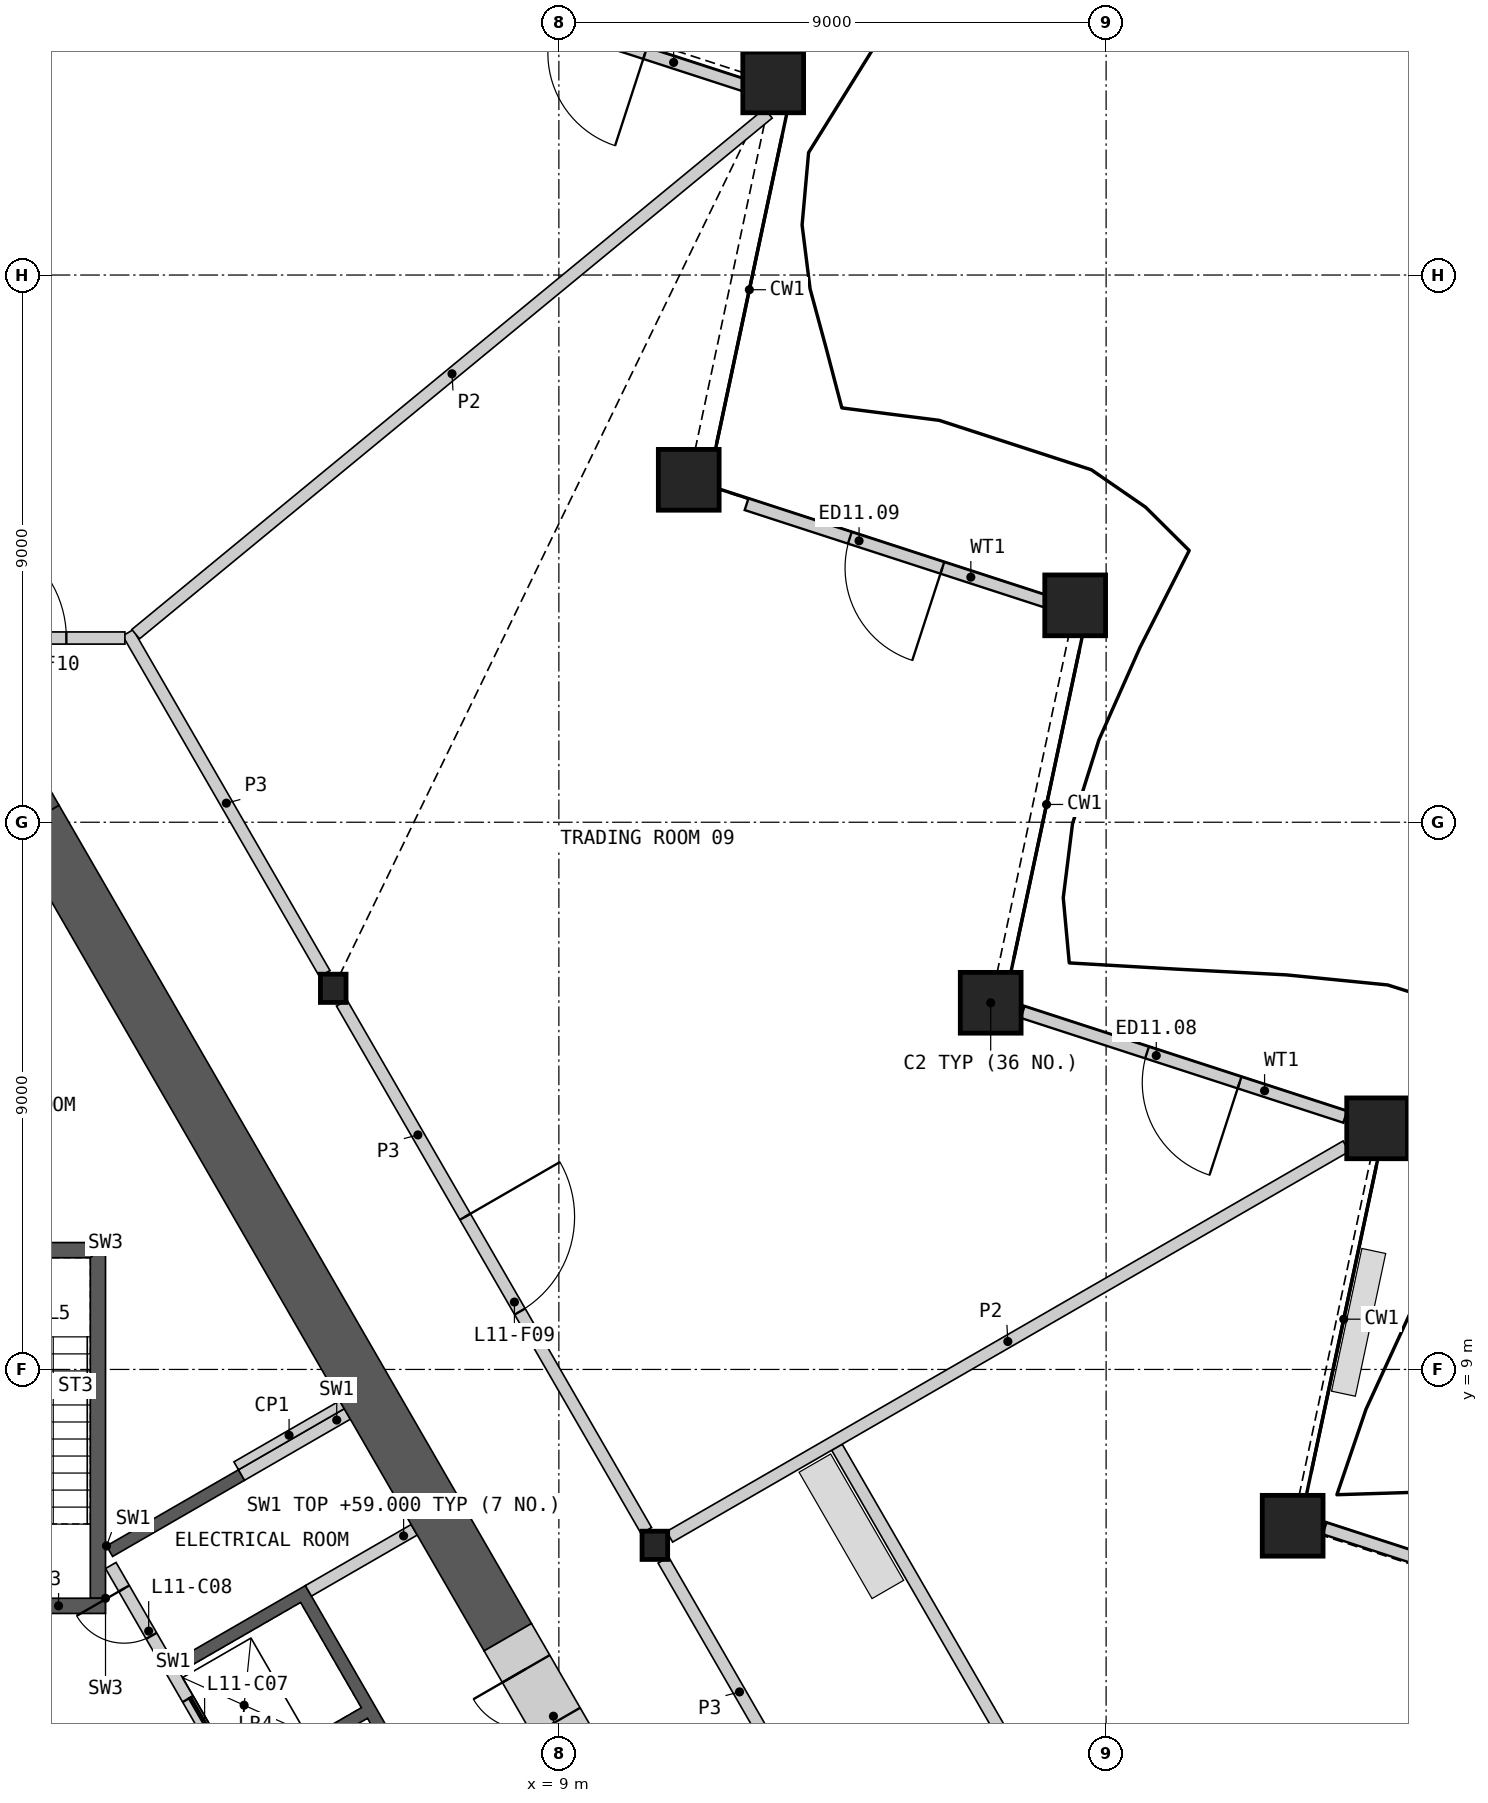
"""IFC4 building model, lengths in metres.
Left out: names, types, materials, properties, quantities, classifications, styles, units other than length and angle.
Written with IfcOpenShell. Run it as: python <this file> out.ifc"""

import sys

from ifc_helpers import new_model, si_unit, direction, frame, frame_2d, origin, origin_2d, place, context, subcontext, project, spatial, polyline, rectangle, hollow_rectangle, i_section, outline, extrude, element, fill, save


model = new_model("IFC4")
c1 = context("Model", 3, precision=1e-05, world=origin(), true_north=direction((0.0, 1.0)))
c2 = subcontext(c1, "Body", "Model", "MODEL_VIEW")
j1 = project(units=[si_unit("LENGTHUNIT", "METRE"), si_unit("PLANEANGLEUNIT", "RADIAN")], contexts=[c1])
p1 = place(None, origin())
s1 = spatial("IfcSite", under=j1, at=p1, CompositionType="ELEMENT")
p2 = place(p1, origin())
s2 = spatial("IfcBuilding", under=s1, at=p2, CompositionType="ELEMENT")
p3 = place(p2, frame((0.0, 0.0, 55.2)))
s3 = spatial("IfcBuildingStorey", under=s2, at=p3, CompositionType="ELEMENT", Elevation=55.2)
for number, where, z_axis, x_axis in (
    (1, (21.068, 6.429, 0.0), (0.0, 0.0, 1.0), (1.0, 0.0, 0.0)),
    (2, (22.457, 12.966, 0.0), (0.0, 0.0, 1.0), (1.0, 0.0, 0.0)),
    (3, (16.102, 15.031, 0.0), (0.0, 0.0, 1.0), (1.0, 0.0, 0.0)),
    (4, (17.491, 21.567, 0.0), (0.0, 0.0, 1.0), (1.0, 0.0, 0.0)),
    (5, (11.136, 23.632, 0.0), (0.0, 0.0, 1.0), (1.0, 0.0, 0.0)),
    (6, (12.525, 30.169, 0.0), (0.0, 0.0, 1.0), (1.0, 0.0, 0.0)),
):
    element("IfcColumn", number, at=place(p3, frame(where, z_axis=z_axis, x_axis=x_axis)), inside=s3, PredefinedType="COLUMN", context=c2, shape_type="SweptSolid", body=[
        extrude(hollow_rectangle(XDim=1.0, YDim=1.0, WallThickness=0.07, at=origin_2d()), origin(), (0.0, 0.0, 1.0), 4.2),
    ])
for number, where, z_axis, x_axis in (
    (7, (10.578, 6.107, 0.0), (0.0, 0.0, 1.0), (1.0, 0.0, 0.0)),
    (8, (5.289, 15.269, 0.0), (0.0, 0.0, 1.0), (1.0, 0.0, 0.0)),
):
    element("IfcColumn", number, at=place(p3, frame(where, z_axis=z_axis, x_axis=x_axis)), inside=s3, PredefinedType="COLUMN", context=c2, shape_type="SweptSolid", body=[
        extrude(i_section(OverallWidth=0.421, OverallDepth=0.465, WebThickness=0.045, FlangeThickness=0.072, at=origin_2d()), origin(), (0.0, 0.0, 1.0), 4.2),
    ])
p4 = place(p3, frame((26.899, 4.661, 0.0), z_axis=(0.0, 0.0, 1.0), x_axis=(-0.951054004345, 0.309024725255, 0.0)))
e9 = element("IfcWall", 9, at=p4, inside=s3, PredefinedType="SOLIDWALL", context=c2, shape_type="SweptSolid", body=[
    extrude(rectangle(XDim=5.579, YDim=0.2, at=frame_2d((2.79, 0.0))), origin(), (0.0, 0.0, 1.0), 3.189),
])
p5 = place(p4, frame((1.91, 0.0, 0.0)))
e10 = element("IfcOpeningElement", 10, at=p5, cuts=e9, PredefinedType="OPENING", context=c2, shape_type="SweptSolid", body=[
    extrude(rectangle(XDim=1.6, YDim=2.4, at=frame_2d((0.8, 1.2))), frame((0.0, 0.11, 0.0), z_axis=(0.0, -1.0, 0.0), x_axis=(1.0, 0.0, 0.0)), (0.0, 0.0, 1.0), 0.22),
])
p6 = place(p3, frame((21.933, 13.153, 0.0), z_axis=(0.0, 0.0, 1.0), x_axis=(-0.951066864375, 0.308985144444, 0.0)))
e11 = element("IfcWall", 11, at=p6, inside=s3, PredefinedType="SOLIDWALL", context=c2, shape_type="SweptSolid", body=[
    extrude(rectangle(XDim=5.579, YDim=0.2, at=frame_2d((2.79, 0.0))), origin(), (0.0, 0.0, 1.0), 3.189),
])
p7 = place(p6, frame((1.828, 0.0, 0.0)))
e12 = element("IfcOpeningElement", 12, at=p7, cuts=e11, PredefinedType="OPENING", context=c2, shape_type="SweptSolid", body=[
    extrude(rectangle(XDim=1.6, YDim=2.4, at=frame_2d((0.8, 1.2))), frame((0.0, 0.11, 0.0), z_axis=(0.0, -1.0, 0.0), x_axis=(1.0, 0.0, 0.0)), (0.0, 0.0, 1.0), 0.22),
])
p8 = place(p3, frame((17.005, 21.631, 0.0), z_axis=(0.0, 0.0, 1.0), x_axis=(-0.951045170621, 0.309051910588, 0.0)))
e13 = element("IfcWall", 13, at=p8, inside=s3, PredefinedType="SOLIDWALL", context=c2, shape_type="SweptSolid", body=[
    extrude(rectangle(XDim=5.171, YDim=0.2, at=frame_2d((2.585, 0.0))), origin(), (0.0, 0.0, 1.0), 3.189),
])
p9 = place(p8, frame((1.786, 0.0, 0.0)))
e14 = element("IfcOpeningElement", 14, at=p9, cuts=e13, PredefinedType="OPENING", context=c2, shape_type="SweptSolid", body=[
    extrude(rectangle(XDim=1.6, YDim=2.4, at=frame_2d((0.8, 1.2))), frame((0.0, 0.11, 0.0), z_axis=(0.0, -1.0, 0.0), x_axis=(1.0, 0.0, 0.0)), (0.0, 0.0, 1.0), 0.22),
])
p10 = place(p3, frame((12.117, 30.097, 0.0), z_axis=(0.0, 0.0, 1.0), x_axis=(-0.951063554534, 0.308995332064, 0.0)))
e15 = element("IfcWall", 15, at=p10, inside=s3, PredefinedType="SOLIDWALL", context=c2, shape_type="SweptSolid", body=[
    extrude(rectangle(XDim=5.171, YDim=0.2, at=frame_2d((2.586, 0.0))), origin(), (0.0, 0.0, 1.0), 3.189),
])
p11 = place(p10, frame((1.786, 0.0, 0.0)))
e16 = element("IfcOpeningElement", 16, at=p11, cuts=e15, PredefinedType="OPENING", context=c2, shape_type="SweptSolid", body=[
    extrude(rectangle(XDim=1.6, YDim=2.4, at=frame_2d((0.8, 1.2))), frame((0.0, 0.11, 0.0), z_axis=(0.0, -1.0, 0.0), x_axis=(1.0, 0.0, 0.0)), (0.0, 0.0, 1.0), 0.22),
])
p12 = place(p3, origin())
e17 = element("IfcWall", 17, at=p12, inside=s3, PredefinedType="SHEAR", context=c2, shape_type="SweptSolid", body=[
    extrude(outline(polyline([(1.561, 6.097), (3.731, 7.35), (3.831, 7.177), (1.66, 5.924), (1.561, 6.097)])), origin(), (0.0, 0.0, 1.0), 3.8),
])
p13 = place(p3, origin())
e18 = element("IfcWall", 18, at=p13, inside=s3, PredefinedType="SHEAR", context=c2, shape_type="SweptSolid", body=[
    extrude(outline(polyline([(2.66, 4.192), (4.831, 5.445), (8.231, -0.444), (6.061, -1.697), (5.96, -1.524), (7.952, -0.374), (6.952, 1.358), (4.96, 0.208), (4.861, 0.381), (6.852, 1.531), (5.852, 3.263), (3.861, 2.113), (3.76, 2.287), (5.752, 3.437), (4.752, 5.169), (2.76, 4.019), (2.66, 4.192)])), origin(), (0.0, 0.0, 1.0), 3.8),
])
p14 = place(p3, frame((5.817, -1.476, 0.0), z_axis=(0.0, 0.0, 1.0), x_axis=(-0.500002616675, 0.866023893041, 0.0)))
e19 = element("IfcWall", 19, at=p14, inside=s3, PredefinedType="SOLIDWALL", context=c2, shape_type="SweptSolid", body=[
    extrude(rectangle(XDim=8.373, YDim=0.2, at=frame_2d((4.187, 0.0))), origin(), (0.0, 0.0, 1.0), 3.8),
])
p15 = place(p14, frame((0.337, 0.0, 0.0)))
e20 = element("IfcOpeningElement", 20, at=p15, cuts=e19, PredefinedType="OPENING", context=c2, shape_type="SweptSolid", body=[
    extrude(rectangle(XDim=1.1, YDim=2.1, at=frame_2d((0.55, 1.05))), frame((0.0, 0.11, 0.0), z_axis=(0.0, -1.0, 0.0), x_axis=(1.0, 0.0, 0.0)), (0.0, 0.0, 1.0), 0.22),
])
p16 = place(p14, frame((2.537, 0.0, 0.0)))
e21 = element("IfcOpeningElement", 21, at=p16, cuts=e19, PredefinedType="OPENING", context=c2, shape_type="SweptSolid", body=[
    extrude(rectangle(XDim=1.1, YDim=2.1, at=frame_2d((0.55, 1.05))), frame((0.0, 0.11, 0.0), z_axis=(0.0, -1.0, 0.0), x_axis=(1.0, 0.0, 0.0)), (0.0, 0.0, 1.0), 0.22),
])
p17 = place(p14, frame((4.737, 0.0, 0.0)))
e22 = element("IfcOpeningElement", 22, at=p17, cuts=e19, PredefinedType="OPENING", context=c2, shape_type="SweptSolid", body=[
    extrude(rectangle(XDim=1.1, YDim=2.1, at=frame_2d((0.55, 1.05))), frame((0.0, 0.11, 0.0), z_axis=(0.0, -1.0, 0.0), x_axis=(1.0, 0.0, 0.0)), (0.0, 0.0, 1.0), 0.22),
])
p18 = place(p14, frame((7.037, 0.0, 0.0)))
e23 = element("IfcOpeningElement", 23, at=p18, cuts=e19, PredefinedType="OPENING", context=c2, shape_type="SweptSolid", body=[
    extrude(rectangle(XDim=0.9, YDim=2.1, at=frame_2d((0.45, 1.05))), frame((0.0, 0.11, 0.0), z_axis=(0.0, -1.0, 0.0), x_axis=(1.0, 0.0, 0.0)), (0.0, 0.0, 1.0), 0.22),
])
p19 = place(p3, frame((4.881, 5.358, 0.0), z_axis=(0.0, 0.0, 1.0), x_axis=(0.866035824272, 0.499981950752, 0.0)))
e24 = element("IfcWall", 24, at=p19, inside=s3, PredefinedType="SHEAR", context=c2, shape_type="SweptSolid", body=[
    extrude(rectangle(XDim=2.009, YDim=0.2, at=frame_2d((1.004, 0.0))), origin(), (0.0, 0.0, 1.0), 3.8),
])
p20 = place(p3, frame((3.781, 7.263, 0.0), z_axis=(0.0, 0.0, 1.0), x_axis=(0.865983199114, 0.50007309351, 0.0)))
e25 = element("IfcWall", 25, at=p20, inside=s3, PredefinedType="SHEAR", context=c2, shape_type="SweptSolid", body=[
    extrude(rectangle(XDim=2.009, YDim=0.2, at=frame_2d((1.004, 0.0))), origin(), (0.0, 0.0, 1.0), 3.8),
])
p21 = place(p3, origin())
e26 = element("IfcWall", 26, at=p21, inside=s3, PredefinedType="SHEAR", context=c2, shape_type="SweptSolid", body=[
    extrude(outline(polyline([(1.544, 5.237), (1.544, 11.087), (1.294, 10.837), (1.294, 5.237), (1.544, 5.237)])), origin(), (0.0, 0.0, 1.0), 3.8),
])
p22 = place(p3, origin())
e27 = element("IfcWall", 27, at=p22, inside=s3, PredefinedType="SHEAR", context=c2, shape_type="SweptSolid", body=[
    extrude(outline(polyline([(1.544, 11.087), (-1.544, 11.087), (-1.294, 10.837), (1.294, 10.837), (1.544, 11.087)])), origin(), (0.0, 0.0, 1.0), 3.8),
])
p23 = place(p3, frame((1.544, 5.112, 0.0), z_axis=(0.0, 0.0, 1.0), x_axis=(-1.0, 0.0, 0.0)))
e28 = element("IfcWall", 28, at=p23, inside=s3, PredefinedType="SHEAR", context=c2, shape_type="SweptSolid", body=[
    extrude(rectangle(XDim=3.088, YDim=0.25, at=frame_2d((1.544, 0.0))), origin(), (0.0, 0.0, 1.0), 3.8),
])
p24 = place(p23, frame((0.994, 0.0, 0.0)))
e29 = element("IfcOpeningElement", 29, at=p24, cuts=e28, PredefinedType="OPENING", context=c2, shape_type="SweptSolid", body=[
    extrude(rectangle(XDim=1.1, YDim=2.1, at=frame_2d((0.55, 1.05))), frame((0.0, 0.135, 0.0), z_axis=(0.0, -1.0, 0.0), x_axis=(1.0, 0.0, 0.0)), (0.0, 0.0, 1.0), 0.27),
])
p25 = place(p3, frame((3.693, 7.415, 0.0), z_axis=(0.0, 0.0, 1.0), x_axis=(0.866035824272, 0.499981950752, 0.0)))
e30 = element("IfcWall", 30, at=p25, inside=s3, PredefinedType="PARTITIONING", context=c2, shape_type="SweptSolid", body=[
    extrude(rectangle(XDim=2.009, YDim=0.15, at=frame_2d((1.004, 0.0))), origin(), (0.0, 0.0, 1.0), 3.8),
])
p26 = place(p3, frame((8.16, 4.596, 0.0), z_axis=(0.0, 0.0, 1.0), x_axis=(-0.500009830349, 0.866019728156, 0.0)))
e31 = element("IfcWall", 31, at=p26, inside=s3, PredefinedType="SHEAR", context=c2, shape_type="SweptSolid", body=[
    extrude(rectangle(XDim=15.541, YDim=0.9, at=frame_2d((7.771, 0.0))), origin(), (0.0, 0.0, 1.0), 3.8),
])
p27 = place(p3, origin())
e32 = element("IfcWall", 32, at=p27, inside=s3, PredefinedType="SHEAR", context=c2, shape_type="SweptSolid", body=[
    extrude(outline(polyline([(-0.779, 18.28), (0.0, 19.63), (0.779, 18.28), (0.0, 17.83), (-0.779, 18.28)])), origin(), (0.0, 0.0, 1.0), 3.8),
])
p28 = place(p3, frame((9.26, 2.691, 0.0), z_axis=(0.0, 0.0, 1.0), x_axis=(-0.499946605688, 0.86605622881, 0.0)))
e33 = element("IfcWall", 33, at=p28, inside=s3, PredefinedType="SHEAR", context=c2, shape_type="SweptSolid", body=[
    extrude(rectangle(XDim=2.2, YDim=0.9, at=frame_2d((1.1, 0.0))), origin(), (0.0, 0.0, 1.0), 3.8),
])
p29 = place(p28, frame((0.6, 0.0, 0.0)))
e34 = element("IfcOpeningElement", 34, at=p29, cuts=e33, PredefinedType="OPENING", context=c2, shape_type="SweptSolid", body=[
    extrude(rectangle(XDim=1.0, YDim=2.1, at=frame_2d((0.5, 1.05))), frame((0.0, 0.46, 0.0), z_axis=(0.0, -1.0, 0.0), x_axis=(1.0, 0.0, 0.0)), (0.0, 0.0, 1.0), 0.92),
])
p30 = place(p3, frame((5.429, 15.026, 0.0), z_axis=(0.0, 0.0, 1.0), x_axis=(0.50001002959, -0.86601961312, 0.0)))
e35 = element("IfcWall", 35, at=p30, inside=s3, PredefinedType="PARTITIONING", context=c2, shape_type="SweptSolid", body=[
    extrude(rectangle(XDim=10.019, YDim=0.2, at=frame_2d((5.009, 0.0))), origin(), (0.0, 0.0, 1.0), 3.8),
])
p31 = place(p30, frame((4.059, 0.0, 0.0)))
e36 = element("IfcOpeningElement", 36, at=p31, cuts=e35, PredefinedType="OPENING", context=c2, shape_type="SweptSolid", body=[
    extrude(rectangle(XDim=1.8, YDim=2.1, at=frame_2d((0.9, 1.05))), frame((0.0, 0.11, 0.0), z_axis=(0.0, -1.0, 0.0), x_axis=(1.0, 0.0, 0.0)), (0.0, 0.0, 1.0), 0.22),
])
p32 = place(p3, frame((10.719, 5.865, 0.0), z_axis=(0.0, 0.0, 1.0), x_axis=(0.49999175339, -0.866030164915, 0.0)))
e37 = element("IfcWall", 37, at=p32, inside=s3, PredefinedType="PARTITIONING", context=c2, shape_type="SweptSolid", body=[
    extrude(rectangle(XDim=10.019, YDim=0.2, at=frame_2d((5.009, 0.0))), origin(), (0.0, 0.0, 1.0), 3.8),
])
p33 = place(p32, frame((4.585, 0.0, 0.0)))
e38 = element("IfcOpeningElement", 38, at=p33, cuts=e37, PredefinedType="OPENING", context=c2, shape_type="SweptSolid", body=[
    extrude(rectangle(XDim=0.95, YDim=2.1, at=frame_2d((0.475, 1.05))), frame((0.0, 0.11, 0.0), z_axis=(0.0, -1.0, 0.0), x_axis=(1.0, 0.0, 0.0)), (0.0, 0.0, 1.0), 0.22),
])
p34 = place(p3, frame((1.913, 21.116, 0.0), z_axis=(0.0, 0.0, 1.0), x_axis=(0.500001069878, -0.866024786089, 0.0)))
e39 = element("IfcWall", 39, at=p34, inside=s3, PredefinedType="PARTITIONING", context=c2, shape_type="SweptSolid", body=[
    extrude(rectangle(XDim=6.473, YDim=0.2, at=frame_2d((3.236, 0.0))), origin(), (0.0, 0.0, 1.0), 3.8),
])
p35 = place(p3, frame((-1.863, 21.03, 0.0), z_axis=(0.0, 0.0, 1.0), x_axis=(1.0, 0.0, 0.0)))
e40 = element("IfcWall", 40, at=p35, inside=s3, PredefinedType="PARTITIONING", context=c2, shape_type="SweptSolid", body=[
    extrude(rectangle(XDim=3.726, YDim=0.2, at=frame_2d((1.863, 0.0))), origin(), (0.0, 0.0, 1.0), 3.8),
])
p36 = place(p35, frame((0.963, 0.0, 0.0)))
e41 = element("IfcOpeningElement", 41, at=p36, cuts=e40, PredefinedType="OPENING", context=c2, shape_type="SweptSolid", body=[
    extrude(rectangle(XDim=1.8, YDim=2.1, at=frame_2d((0.9, 1.05))), frame((0.0, 0.11, 0.0), z_axis=(0.0, -1.0, 0.0), x_axis=(1.0, 0.0, 0.0)), (0.0, 0.0, 1.0), 0.22),
])
p37 = place(p3, frame((13.573, 7.721, 0.0), z_axis=(0.0, 0.0, 1.0), x_axis=(0.499990262232, -0.866031025814, 0.0)))
e42 = element("IfcWall", 42, at=p37, inside=s3, PredefinedType="PARTITIONING", context=c2, shape_type="SweptSolid", body=[
    extrude(rectangle(XDim=17.597, YDim=0.2, at=frame_2d((8.799, 0.0))), origin(), (0.0, 0.0, 1.0), 2.885),
])
p38 = place(p37, frame((9.277, 0.0, 0.0)))
e43 = element("IfcOpeningElement", 43, at=p38, cuts=e42, PredefinedType="OPENING", context=c2, shape_type="SweptSolid", body=[
    extrude(rectangle(XDim=0.95, YDim=2.1, at=frame_2d((0.475, 1.05))), frame((0.0, 0.11, 0.0), z_axis=(0.0, -1.0, 0.0), x_axis=(1.0, 0.0, 0.0)), (0.0, 0.0, 1.0), 0.22),
])
p39 = place(p3, frame((2.04, 21.094, 0.0), z_axis=(0.0, 0.0, 1.0), x_axis=(0.772048928551, 0.635563098302, 0.0)))
e44 = element("IfcWall", 44, at=p39, inside=s3, PredefinedType="PARTITIONING", context=c2, shape_type="SweptSolid", body=[
    extrude(rectangle(XDim=13.477, YDim=0.2, at=frame_2d((6.738, 0.0))), origin(), (0.0, 0.0, 1.0), 2.885),
])
p40 = place(p3, frame((10.821, 6.247, 0.0), z_axis=(0.0, 0.0, 1.0), x_axis=(0.866026729935, 0.499997703033, 0.0)))
e45 = element("IfcWall", 45, at=p40, inside=s3, PredefinedType="PARTITIONING", context=c2, shape_type="SweptSolid", body=[
    extrude(rectangle(XDim=12.848, YDim=0.2, at=frame_2d((6.424, 0.0))), origin(), (0.0, 0.0, 1.0), 2.885),
])
p41 = place(p7, origin())
e46 = element("IfcDoor", 46, at=p41, inside=s3, OperationType="DOUBLE_DOOR_SINGLE_SWING", PredefinedType="DOOR", context=c2, shape_type="SweptSolid", body=[
    extrude(rectangle(XDim=1.6, YDim=2.4, at=frame_2d((0.8, 1.2))), frame((0.0, 0.025, 0.0), z_axis=(0.0, -1.0, 0.0), x_axis=(1.0, 0.0, 0.0)), (0.0, 0.0, 1.0), 0.05),
])
fill(e12, e46)
p42 = place(p9, origin())
e47 = element("IfcDoor", 47, at=p42, inside=s3, OperationType="DOUBLE_DOOR_SINGLE_SWING", PredefinedType="DOOR", context=c2, shape_type="SweptSolid", body=[
    extrude(rectangle(XDim=1.6, YDim=2.4, at=frame_2d((0.8, 1.2))), frame((0.0, 0.025, 0.0), z_axis=(0.0, -1.0, 0.0), x_axis=(1.0, 0.0, 0.0)), (0.0, 0.0, 1.0), 0.05),
])
fill(e14, e47)
p43 = place(p11, origin())
e48 = element("IfcDoor", 48, at=p43, inside=s3, OperationType="DOUBLE_DOOR_SINGLE_SWING", PredefinedType="DOOR", context=c2, shape_type="SweptSolid", body=[
    extrude(rectangle(XDim=1.6, YDim=2.4, at=frame_2d((0.8, 1.2))), frame((0.0, 0.025, 0.0), z_axis=(0.0, -1.0, 0.0), x_axis=(1.0, 0.0, 0.0)), (0.0, 0.0, 1.0), 0.05),
])
fill(e16, e48)
p44 = place(p17, origin())
e49 = element("IfcDoor", 49, at=p44, inside=s3, OperationType="SLIDING_TO_LEFT", PredefinedType="DOOR", context=c2, shape_type="SweptSolid", body=[
    extrude(rectangle(XDim=1.1, YDim=2.1, at=frame_2d((0.55, 1.05))), frame((0.0, 0.025, 0.0), z_axis=(0.0, -1.0, 0.0), x_axis=(1.0, 0.0, 0.0)), (0.0, 0.0, 1.0), 0.05),
])
fill(e22, e49)
p45 = place(p18, origin())
e50 = element("IfcDoor", 50, at=p45, inside=s3, OperationType="SINGLE_SWING_RIGHT", PredefinedType="DOOR", context=c2, shape_type="SweptSolid", body=[
    extrude(rectangle(XDim=0.9, YDim=2.1, at=frame_2d((0.45, 1.05))), frame((0.0, 0.025, 0.0), z_axis=(0.0, -1.0, 0.0), x_axis=(1.0, 0.0, 0.0)), (0.0, 0.0, 1.0), 0.05),
])
fill(e23, e50)
p46 = place(p29, origin())
e51 = element("IfcDoor", 51, at=p46, inside=s3, OperationType="SINGLE_SWING_RIGHT", PredefinedType="DOOR", context=c2, shape_type="SweptSolid", body=[
    extrude(rectangle(XDim=1.0, YDim=2.1, at=frame_2d((0.5, 1.05))), frame((0.0, 0.205, 0.0), z_axis=(0.0, -1.0, 0.0), x_axis=(1.0, 0.0, 0.0)), (0.0, 0.0, 1.0), 0.05),
])
fill(e34, e51)
p47 = place(p31, origin())
e52 = element("IfcDoor", 52, at=p47, inside=s3, OperationType="DOUBLE_DOOR_SINGLE_SWING", PredefinedType="DOOR", context=c2, shape_type="SweptSolid", body=[
    extrude(rectangle(XDim=1.8, YDim=2.1, at=frame_2d((0.9, 1.05))), frame((0.0, 0.025, 0.0), z_axis=(0.0, -1.0, 0.0), x_axis=(1.0, 0.0, 0.0)), (0.0, 0.0, 1.0), 0.05),
])
fill(e36, e52)
p48 = place(p36, origin())
e53 = element("IfcDoor", 53, at=p48, inside=s3, OperationType="DOUBLE_DOOR_SINGLE_SWING", PredefinedType="DOOR", context=c2, shape_type="SweptSolid", body=[
    extrude(rectangle(XDim=1.8, YDim=2.1, at=frame_2d((0.9, 1.05))), frame((0.0, 0.025, 0.0), z_axis=(0.0, -1.0, 0.0), x_axis=(1.0, 0.0, 0.0)), (0.0, 0.0, 1.0), 0.05),
])
fill(e41, e53)
save(model, sys.argv[1])
